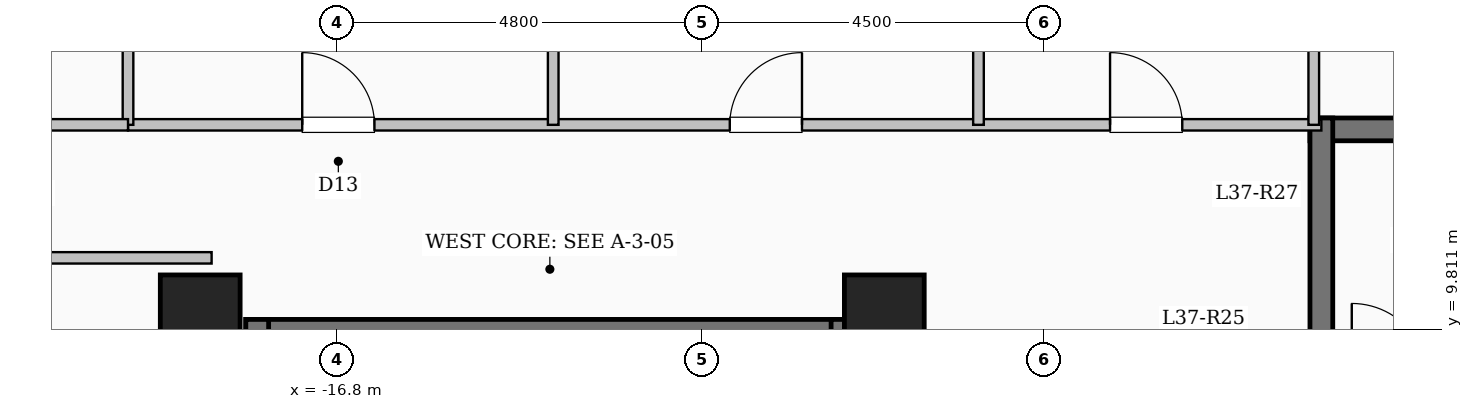
"""IFC4 building model, lengths in metres.
Left out: names, types, materials, properties, quantities, classifications, styles, units other than length and angle.
Written with IfcOpenShell. Run it as: python <this file> out.ifc"""

import sys

from ifc_helpers import new_model, si_unit, direction, frame, frame_2d, origin, origin_2d, place, context, subcontext, project, spatial, rectangle, extrude, element, fill, save


model = new_model("IFC4")
c1 = context("Model", 3, precision=1e-05, world=origin(), true_north=direction((0.0, 1.0)))
c2 = subcontext(c1, "Body", "Model", "MODEL_VIEW")
j1 = project(units=[si_unit("LENGTHUNIT", "METRE"), si_unit("PLANEANGLEUNIT", "RADIAN")], contexts=[c1])
p1 = place(None, origin())
s1 = spatial("IfcSite", under=j1, at=p1, CompositionType="ELEMENT")
p2 = place(p1, origin())
s2 = spatial("IfcBuilding", under=s1, at=p2, CompositionType="ELEMENT")
p3 = place(p2, frame((0.0, 0.0, 139.3)))
s3 = spatial("IfcBuildingStorey", under=s2, at=p3, CompositionType="ELEMENT", Elevation=139.3)
for number, where, z_axis, x_axis in (
    (1, (-9.6, 10.0, 0.0), (0.0, 0.0, 1.0), (1.0, 0.0, 0.0)),
    (2, (-18.6, 10.0, 0.0), (0.0, 0.0, 1.0), (1.0, 0.0, 0.0)),
):
    element("IfcColumn", number, at=place(p3, frame(where, z_axis=z_axis, x_axis=x_axis)), inside=s3, PredefinedType="COLUMN", context=c2, shape_type="SweptSolid", body=[
        extrude(rectangle(XDim=1.05, YDim=1.05, at=origin_2d()), origin(), (0.0, 0.0, 1.0), 3.35),
    ])
p4 = place(p3, frame((-18.0, 9.79, 0.0), z_axis=(0.0, 0.0, 1.0), x_axis=(1.0, 0.0, 0.0)))
e3 = element("IfcWall", 3, at=p4, inside=s3, PredefinedType="SHEAR", context=c2, shape_type="SweptSolid", body=[
    extrude(rectangle(XDim=8.0, YDim=0.3, at=frame_2d((4.0, 0.0))), origin(), (0.0, 0.0, 1.0), 3.35),
])
for number, where, z_axis, x_axis in (
    (4, (-17.85, 6.35, 0.0), (0.0, 0.0, 1.0), (0.0, 1.0, 0.0)),
    (5, (-10.15, 6.35, 0.0), (0.0, 0.0, 1.0), (0.0, 1.0, 0.0)),
):
    element("IfcWall", number, at=place(p3, frame(where, z_axis=z_axis, x_axis=x_axis)), inside=s3, PredefinedType="SHEAR", context=c2, shape_type="SweptSolid", body=[
        extrude(rectangle(XDim=3.59, YDim=0.3, at=frame_2d((1.795, 0.0))), origin(), (0.0, 0.0, 1.0), 3.35),
    ])
p5 = place(p3, frame((-4.0, 12.44, 0.0), z_axis=(0.0, 0.0, 1.0), x_axis=(1.0, 0.0, 0.0)))
e6 = element("IfcWall", 6, at=p5, inside=s3, PredefinedType="SHEAR", context=c2, shape_type="SweptSolid", body=[
    extrude(rectangle(XDim=8.0, YDim=0.3, at=frame_2d((4.0, 0.0))), origin(), (0.0, 0.0, 1.0), 3.35),
])
p6 = place(p3, frame((-3.85, 9.0, 0.0), z_axis=(0.0, 0.0, 1.0), x_axis=(0.0, 1.0, 0.0)))
e7 = element("IfcWall", 7, at=p6, inside=s3, PredefinedType="SHEAR", context=c2, shape_type="SweptSolid", body=[
    extrude(rectangle(XDim=3.59, YDim=0.3, at=frame_2d((1.795, 0.0))), origin(), (0.0, 0.0, 1.0), 3.35),
])
p7 = place(p3, frame((-19.55, 12.5, 0.0), z_axis=(0.0, 0.0, 1.0), x_axis=(1.0, 0.0, 0.0)))
e8 = element("IfcWall", 8, at=p7, inside=s3, PredefinedType="PARTITIONING", context=c2, shape_type="SweptSolid", body=[
    extrude(rectangle(XDim=15.7, YDim=0.15, at=frame_2d((7.85, 0.0))), origin(), (0.0, 0.0, 1.0), 3.1),
])
p8 = place(p7, frame((2.292, 0.0, 0.0)))
e9 = element("IfcOpeningElement", 9, at=p8, cuts=e8, PredefinedType="OPENING", context=c2, shape_type="SweptSolid", body=[
    extrude(rectangle(XDim=0.95, YDim=2.15, at=frame_2d((0.475, 1.075))), frame((0.0, 0.085, 0.0), z_axis=(0.0, -1.0, 0.0), x_axis=(1.0, 0.0, 0.0)), (0.0, 0.0, 1.0), 0.17),
])
p9 = place(p7, frame((7.917, 0.0, 0.0)))
e10 = element("IfcOpeningElement", 10, at=p9, cuts=e8, PredefinedType="OPENING", context=c2, shape_type="SweptSolid", body=[
    extrude(rectangle(XDim=0.95, YDim=2.15, at=frame_2d((0.475, 1.075))), frame((0.0, 0.085, 0.0), z_axis=(0.0, -1.0, 0.0), x_axis=(1.0, 0.0, 0.0)), (0.0, 0.0, 1.0), 0.17),
])
p10 = place(p7, frame((12.92, 0.0, 0.0)))
e11 = element("IfcOpeningElement", 11, at=p10, cuts=e8, PredefinedType="OPENING", context=c2, shape_type="SweptSolid", body=[
    extrude(rectangle(XDim=0.95, YDim=2.15, at=frame_2d((0.475, 1.075))), frame((0.0, 0.085, 0.0), z_axis=(0.0, -1.0, 0.0), x_axis=(1.0, 0.0, 0.0)), (0.0, 0.0, 1.0), 0.17),
])
p11 = place(p3, frame((-3.95, 12.5, 0.0), z_axis=(0.0, 0.0, 1.0), x_axis=(0.0, 1.0, 0.0)))
e12 = element("IfcWall", 12, at=p11, inside=s3, PredefinedType="PARTITIONING", context=c2, shape_type="SweptSolid", body=[
    extrude(rectangle(XDim=8.65, YDim=0.14, at=frame_2d((4.325, 0.0))), origin(), (0.0, 0.0, 1.0), 3.1),
])
p12 = place(p11, frame((1.2, 0.0, 0.0)))
e13 = element("IfcOpeningElement", 13, at=p12, cuts=e12, PredefinedType="OPENING", context=c2, shape_type="SweptSolid", body=[
    extrude(rectangle(XDim=0.95, YDim=2.15, at=frame_2d((0.475, 1.075))), frame((0.0, 0.08, 0.0), z_axis=(0.0, -1.0, 0.0), x_axis=(1.0, 0.0, 0.0)), (0.0, 0.0, 1.0), 0.16),
])
for number, where, z_axis, x_axis in (
    (14, (-13.956, 12.5, 0.0), (0.0, 0.0, 1.0), (0.0, 1.0, 0.0)),
    (15, (-8.361, 12.5, 0.0), (0.0, 0.0, 1.0), (0.0, 1.0, 0.0)),
):
    element("IfcWall", number, at=place(p3, frame(where, z_axis=z_axis, x_axis=x_axis)), inside=s3, PredefinedType="PARTITIONING", context=c2, shape_type="SweptSolid", body=[
        extrude(rectangle(XDim=8.65, YDim=0.14, at=frame_2d((4.325, 0.0))), origin(), (0.0, 0.0, 1.0), 3.1),
    ])
p13 = place(p3, frame((-25.08, 10.75, 0.0), z_axis=(0.0, 0.0, 1.0), x_axis=(1.0, 0.0, 0.0)))
e16 = element("IfcWall", 16, at=p13, inside=s3, PredefinedType="PARTITIONING", context=c2, shape_type="SweptSolid", body=[
    extrude(rectangle(XDim=6.63, YDim=0.15, at=frame_2d((3.315, 0.0))), origin(), (0.0, 0.0, 1.0), 3.1),
])
p14 = place(p3, frame((-19.55, 12.5, 0.0), z_axis=(0.0, 0.0, 1.0), x_axis=(0.0, 1.0, 0.0)))
e17 = element("IfcWall", 17, at=p14, inside=s3, PredefinedType="PARTITIONING", context=c2, shape_type="SweptSolid", body=[
    extrude(rectangle(XDim=4.75, YDim=0.14, at=frame_2d((2.375, 0.0))), origin(), (0.0, 0.0, 1.0), 3.1),
])
p15 = place(p3, frame((-25.08, 12.5, 0.0), z_axis=(0.0, 0.0, 1.0), x_axis=(1.0, 0.0, 0.0)))
e18 = element("IfcWall", 18, at=p15, inside=s3, PredefinedType="PARTITIONING", context=c2, shape_type="SweptSolid", body=[
    extrude(rectangle(XDim=5.53, YDim=0.15, at=frame_2d((2.765, 0.0))), origin(), (0.0, 0.0, 1.0), 3.1),
])
p16 = place(p15, frame((2.29, 0.0, 0.0)))
e19 = element("IfcOpeningElement", 19, at=p16, cuts=e18, PredefinedType="OPENING", context=c2, shape_type="SweptSolid", body=[
    extrude(rectangle(XDim=0.95, YDim=2.15, at=frame_2d((0.475, 1.075))), frame((0.0, 0.085, 0.0), z_axis=(0.0, -1.0, 0.0), x_axis=(1.0, 0.0, 0.0)), (0.0, 0.0, 1.0), 0.17),
])
p17 = place(p8, origin())
e20 = element("IfcDoor", 20, at=p17, inside=s3, OperationType="SINGLE_SWING_LEFT", PredefinedType="DOOR", context=c2, shape_type="SweptSolid", body=[
    extrude(rectangle(XDim=0.95, YDim=2.15, at=frame_2d((0.475, 1.075))), frame((0.0, 0.025, 0.0), z_axis=(0.0, -1.0, 0.0), x_axis=(1.0, 0.0, 0.0)), (0.0, 0.0, 1.0), 0.05),
])
fill(e9, e20)
p18 = place(p9, origin())
e21 = element("IfcDoor", 21, at=p18, inside=s3, OperationType="SINGLE_SWING_RIGHT", PredefinedType="DOOR", context=c2, shape_type="SweptSolid", body=[
    extrude(rectangle(XDim=0.95, YDim=2.15, at=frame_2d((0.475, 1.075))), frame((0.0, 0.025, 0.0), z_axis=(0.0, -1.0, 0.0), x_axis=(1.0, 0.0, 0.0)), (0.0, 0.0, 1.0), 0.05),
])
fill(e10, e21)
p19 = place(p10, origin())
e22 = element("IfcDoor", 22, at=p19, inside=s3, OperationType="SINGLE_SWING_LEFT", PredefinedType="DOOR", context=c2, shape_type="SweptSolid", body=[
    extrude(rectangle(XDim=0.95, YDim=2.15, at=frame_2d((0.475, 1.075))), frame((0.0, 0.025, 0.0), z_axis=(0.0, -1.0, 0.0), x_axis=(1.0, 0.0, 0.0)), (0.0, 0.0, 1.0), 0.05),
])
fill(e11, e22)
save(model, sys.argv[1])
